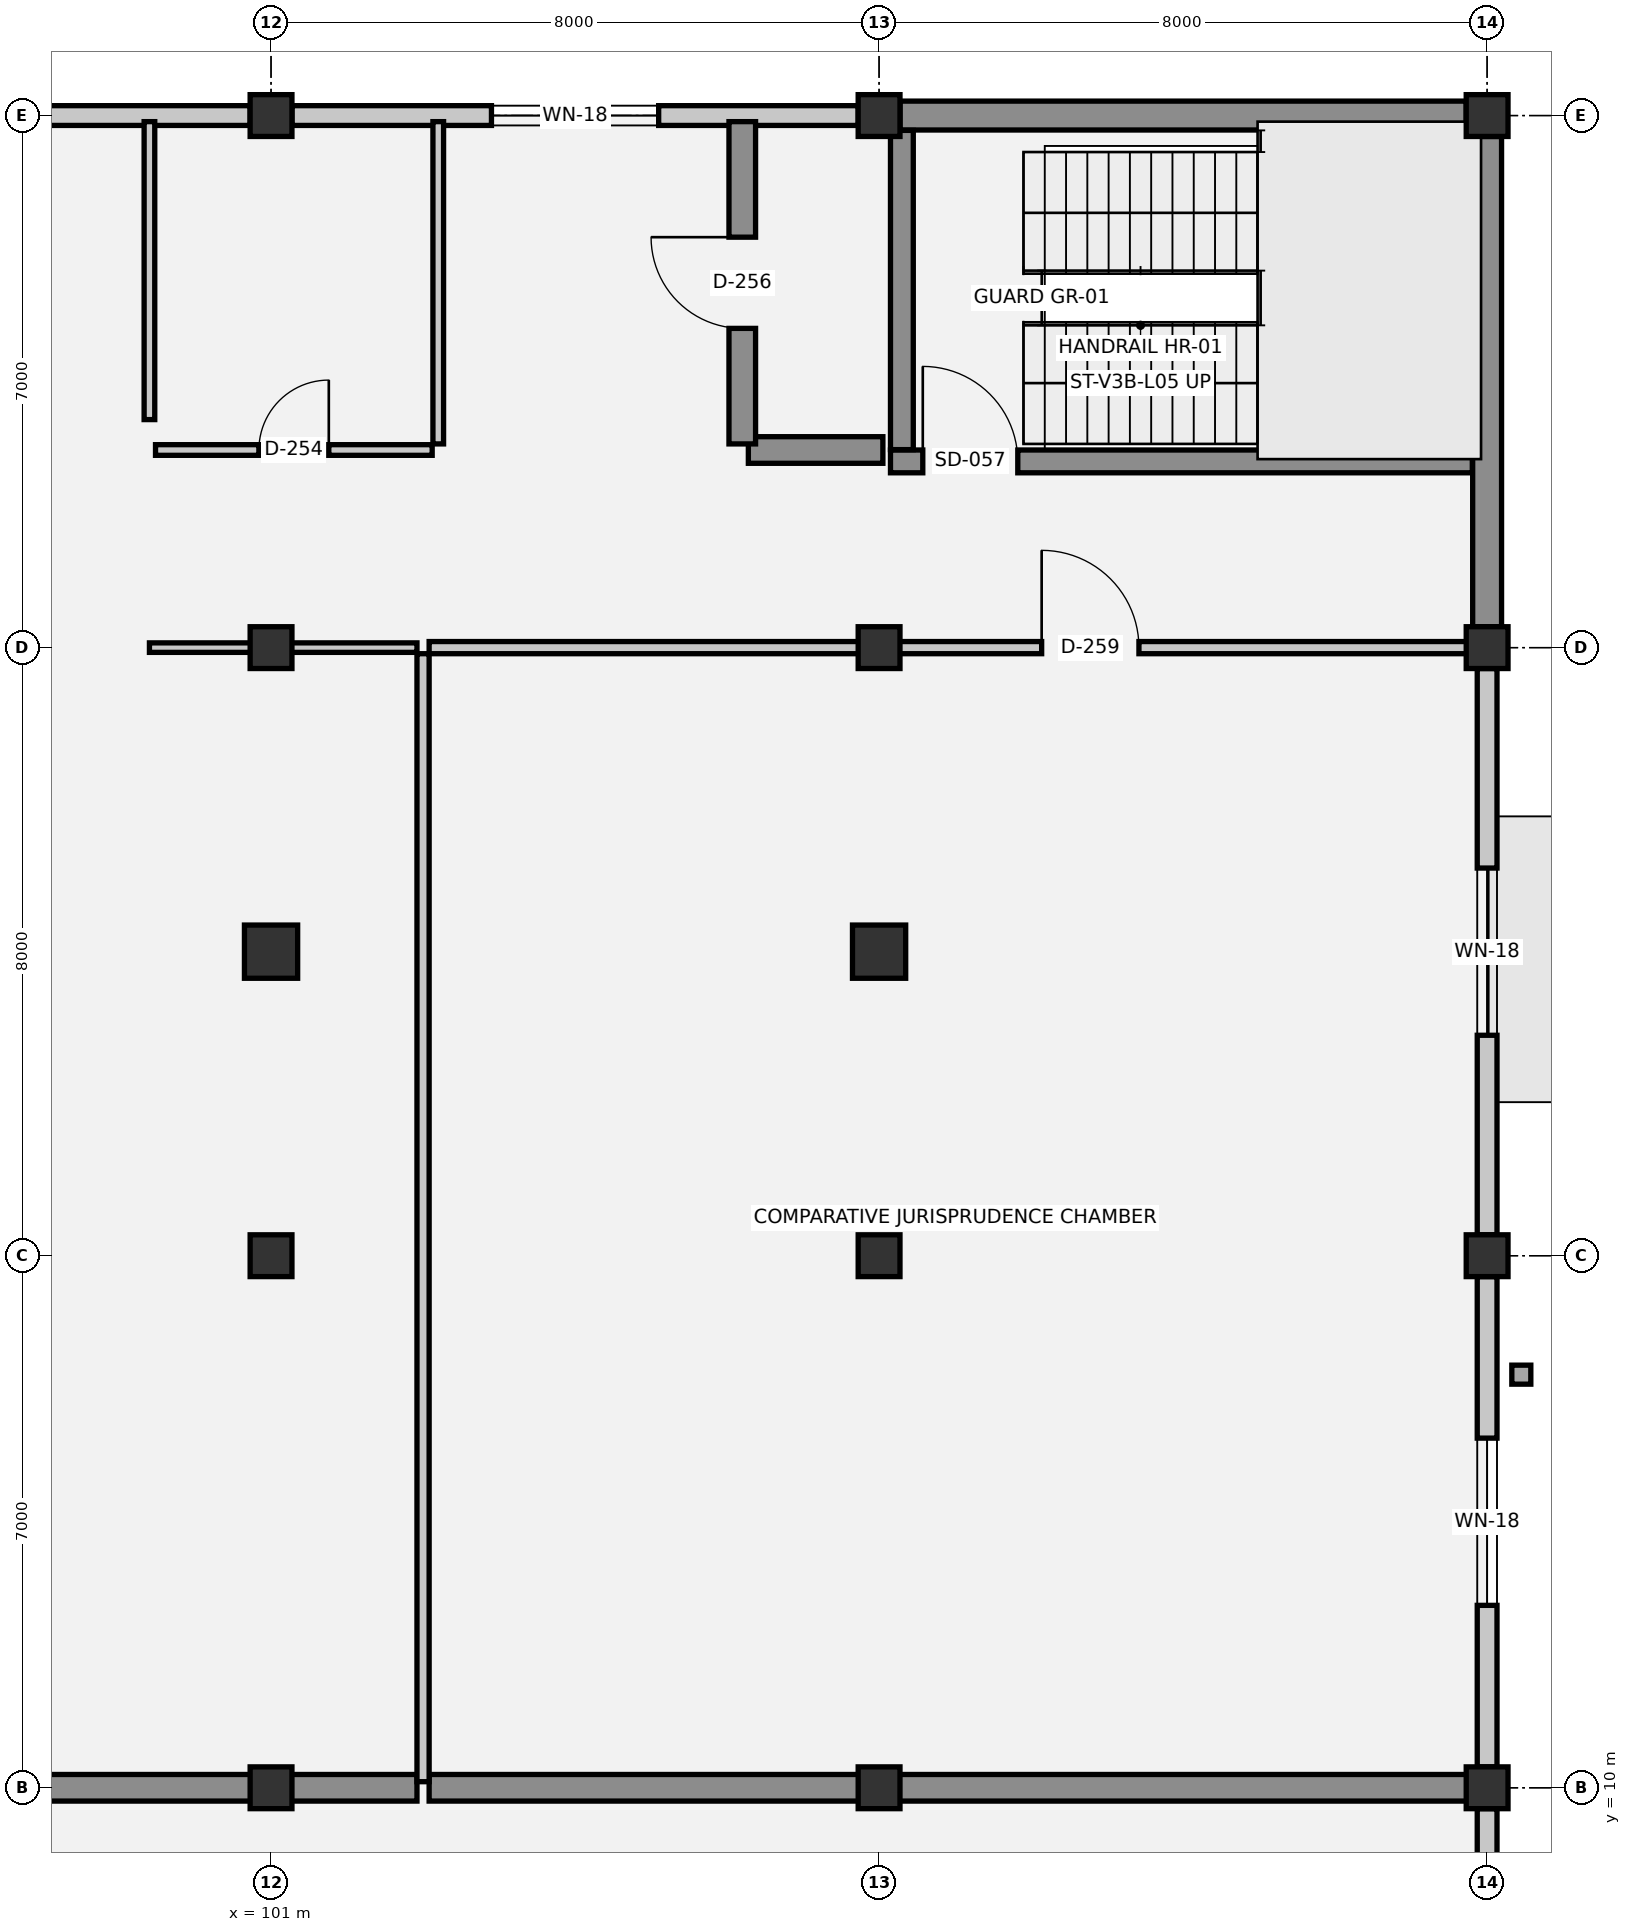
"""IFC4 building model, lengths in metres.
Left out: names, types, materials, properties, quantities, classifications, styles, units other than length and angle.
Written with IfcOpenShell. Run it as: python <this file> out.ifc"""

import sys

from ifc_helpers import new_model, si_unit, direction, frame, frame_2d, origin, origin_2d, place, context, subcontext, project, spatial, rectangle, circle, extrude, element, fill, save


model = new_model("IFC4")
c1 = context("Model", 3, precision=1e-05, world=origin(), true_north=direction((0.0, 1.0)))
c2 = subcontext(c1, "Body", "Model", "MODEL_VIEW")
j1 = project(units=[si_unit("LENGTHUNIT", "METRE"), si_unit("PLANEANGLEUNIT", "RADIAN")], contexts=[c1])
p1 = place(None, origin())
s1 = spatial("IfcSite", under=j1, at=p1, CompositionType="ELEMENT")
p2 = place(p1, origin())
s2 = spatial("IfcBuilding", under=s1, at=p2, CompositionType="ELEMENT")
p3 = place(p2, frame((0.0, 0.0, 18.3)))
s3 = spatial("IfcBuildingStorey", under=s2, at=p3, CompositionType="ELEMENT", Elevation=18.3)
for number, where, z_axis, x_axis in (
    (1, (101.0, 10.0, 0.0), (0.0, 0.0, 1.0), (1.0, 0.0, 0.0)),
    (2, (101.0, 17.0, 0.0), (0.0, 0.0, 1.0), (1.0, 0.0, 0.0)),
    (3, (101.0, 25.0, 0.0), (0.0, 0.0, 1.0), (1.0, 0.0, 0.0)),
    (4, (101.0, 32.0, 0.0), (0.0, 0.0, 1.0), (1.0, 0.0, 0.0)),
    (5, (109.0, 10.0, 0.0), (0.0, 0.0, 1.0), (1.0, 0.0, 0.0)),
    (6, (109.0, 17.0, 0.0), (0.0, 0.0, 1.0), (1.0, 0.0, 0.0)),
    (7, (109.0, 25.0, 0.0), (0.0, 0.0, 1.0), (1.0, 0.0, 0.0)),
    (8, (109.0, 32.0, 0.0), (0.0, 0.0, 1.0), (1.0, 0.0, 0.0)),
    (9, (117.0, 10.0, 0.0), (0.0, 0.0, 1.0), (1.0, 0.0, 0.0)),
    (10, (117.0, 17.0, 0.0), (0.0, 0.0, 1.0), (1.0, 0.0, 0.0)),
    (11, (117.0, 25.0, 0.0), (0.0, 0.0, 1.0), (1.0, 0.0, 0.0)),
    (12, (117.0, 32.0, 0.0), (0.0, 0.0, 1.0), (1.0, 0.0, 0.0)),
):
    element("IfcColumn", number, at=place(p3, frame(where, z_axis=z_axis, x_axis=x_axis)), inside=s3, PredefinedType="COLUMN", context=c2, shape_type="SweptSolid", body=[
        extrude(rectangle(XDim=0.55, YDim=0.55, at=origin_2d()), origin(), (0.0, 0.0, 1.0), 3.75),
    ])
for number, where, z_axis, x_axis in (
    (13, (101.0, 21.0, 0.0), (0.0, 0.0, 1.0), (1.0, 0.0, 0.0)),
    (14, (109.0, 21.0, 0.0), (0.0, 0.0, 1.0), (1.0, 0.0, 0.0)),
):
    element("IfcColumn", number, at=place(p3, frame(where, z_axis=z_axis, x_axis=x_axis)), inside=s3, PredefinedType="COLUMN", context=c2, shape_type="SweptSolid", body=[
        extrude(circle(Radius=0.35, at=origin_2d()), origin(), (0.0, 0.0, 1.0), 3.75),
    ])
p4 = place(p3, frame((93.275, 32.0, 0.0), z_axis=(0.0, 0.0, 1.0), x_axis=(1.0, 0.0, 0.0)))
e15 = element("IfcWall", 15, at=p4, inside=s3, PredefinedType="SOLIDWALL", context=c2, shape_type="SweptSolid", body=[
    extrude(rectangle(XDim=7.45, YDim=0.26, at=frame_2d((3.725, 0.0))), origin(), (0.0, 0.0, 1.0), 2.69),
])
p5 = place(p4, frame((1.525, 0.0, 0.0)))
e16 = element("IfcOpeningElement", 16, at=p5, cuts=e15, PredefinedType="OPENING", context=c2, shape_type="SweptSolid", body=[
    extrude(rectangle(XDim=1.8, YDim=2.25, at=frame_2d((0.9, 1.125))), frame((0.0, 0.14, 0.0), z_axis=(0.0, -1.0, 0.0), x_axis=(1.0, 0.0, 0.0)), (0.0, 0.0, 1.0), 0.28),
])
p6 = place(p3, frame((101.275, 32.0, 0.0), z_axis=(0.0, 0.0, 1.0), x_axis=(1.0, 0.0, 0.0)))
e17 = element("IfcWall", 17, at=p6, inside=s3, PredefinedType="SOLIDWALL", context=c2, shape_type="SweptSolid", body=[
    extrude(rectangle(XDim=7.45, YDim=0.26, at=frame_2d((3.725, 0.0))), origin(), (0.0, 0.0, 1.0), 2.69),
])
p7 = place(p6, frame((2.625, 0.0, 0.9)))
e18 = element("IfcOpeningElement", 18, at=p7, cuts=e17, PredefinedType="OPENING", context=c2, shape_type="SweptSolid", body=[
    extrude(rectangle(XDim=2.2, YDim=1.0, at=frame_2d((1.1, 0.5))), frame((0.0, 0.14, 0.0), z_axis=(0.0, -1.0, 0.0), x_axis=(1.0, 0.0, 0.0)), (0.0, 0.0, 1.0), 0.28),
])
p8 = place(p3, frame((109.275, 32.0, 0.0), z_axis=(0.0, 0.0, 1.0), x_axis=(1.0, 0.0, 0.0)))
e19 = element("IfcWall", 19, at=p8, inside=s3, PredefinedType="STANDARD", context=c2, shape_type="SweptSolid", body=[
    extrude(rectangle(XDim=7.45, YDim=0.38, at=frame_2d((3.725, 0.0))), origin(), (0.0, 0.0, 1.0), 2.69),
])
p9 = place(p3, frame((117.0, 31.725, 0.0), z_axis=(0.0, 0.0, 1.0), x_axis=(0.0, -1.0, 0.0)))
e20 = element("IfcWall", 20, at=p9, inside=s3, PredefinedType="STANDARD", context=c2, shape_type="SweptSolid", body=[
    extrude(rectangle(XDim=6.45, YDim=0.38, at=frame_2d((3.225, 0.0))), origin(), (0.0, 0.0, 1.0), 2.69),
])
p10 = place(p3, frame((117.0, 24.725, 0.0), z_axis=(0.0, 0.0, 1.0), x_axis=(0.0, -1.0, 0.0)))
e21 = element("IfcWall", 21, at=p10, inside=s3, PredefinedType="SOLIDWALL", context=c2, shape_type="SweptSolid", body=[
    extrude(rectangle(XDim=7.45, YDim=0.26, at=frame_2d((3.725, 0.0))), origin(), (0.0, 0.0, 1.0), 2.69),
])
p11 = place(p10, frame((2.625, 0.0, 0.9)))
e22 = element("IfcOpeningElement", 22, at=p11, cuts=e21, PredefinedType="OPENING", context=c2, shape_type="SweptSolid", body=[
    extrude(rectangle(XDim=2.2, YDim=1.0, at=frame_2d((1.1, 0.5))), frame((0.0, 0.14, 0.0), z_axis=(0.0, -1.0, 0.0), x_axis=(1.0, 0.0, 0.0)), (0.0, 0.0, 1.0), 0.28),
])
p12 = place(p3, frame((117.0, 16.725, 0.0), z_axis=(0.0, 0.0, 1.0), x_axis=(0.0, -1.0, 0.0)))
e23 = element("IfcWall", 23, at=p12, inside=s3, PredefinedType="SOLIDWALL", context=c2, shape_type="SweptSolid", body=[
    extrude(rectangle(XDim=6.45, YDim=0.26, at=frame_2d((3.225, 0.0))), origin(), (0.0, 0.0, 1.0), 2.69),
])
p13 = place(p12, frame((2.125, 0.0, 0.9)))
e24 = element("IfcOpeningElement", 24, at=p13, cuts=e23, PredefinedType="OPENING", context=c2, shape_type="SweptSolid", body=[
    extrude(rectangle(XDim=2.2, YDim=1.0, at=frame_2d((1.1, 0.5))), frame((0.0, 0.14, 0.0), z_axis=(0.0, -1.0, 0.0), x_axis=(1.0, 0.0, 0.0)), (0.0, 0.0, 1.0), 0.28),
])
p14 = place(p3, frame((117.0, 9.725, 0.0), z_axis=(0.0, 0.0, 1.0), x_axis=(0.0, -1.0, 0.0)))
e25 = element("IfcWall", 25, at=p14, inside=s3, PredefinedType="SOLIDWALL", context=c2, shape_type="SweptSolid", body=[
    extrude(rectangle(XDim=5.45, YDim=0.26, at=frame_2d((2.725, 0.0))), origin(), (0.0, 0.0, 1.0), 2.69),
])
p15 = place(p14, frame((2.175, 0.0, 0.9)))
e26 = element("IfcOpeningElement", 26, at=p15, cuts=e25, PredefinedType="OPENING", context=c2, shape_type="SweptSolid", body=[
    extrude(rectangle(XDim=1.1, YDim=1.2, at=frame_2d((0.55, 0.6))), frame((0.0, 0.14, 0.0), z_axis=(0.0, -1.0, 0.0), x_axis=(1.0, 0.0, 0.0)), (0.0, 0.0, 1.0), 0.28),
])
p16 = place(p3, frame((109.15, 27.45, 0.0), z_axis=(0.0, 0.0, 1.0), x_axis=(1.0, 0.0, 0.0)))
e27 = element("IfcWall", 27, at=p16, inside=s3, PredefinedType="SHEAR", context=c2, shape_type="SweptSolid", body=[
    extrude(rectangle(XDim=7.655, YDim=0.3, at=frame_2d((3.828, 0.0))), origin(), (0.0, 0.0, 1.0), 3.41),
])
p17 = place(p16, frame((0.425, 0.0, 0.0)))
e28 = element("IfcOpeningElement", 28, at=p17, cuts=e27, PredefinedType="OPENING", context=c2, shape_type="SweptSolid", body=[
    extrude(rectangle(XDim=1.25, YDim=2.15, at=frame_2d((0.625, 1.075))), frame((0.0, 0.16, 0.0), z_axis=(0.0, -1.0, 0.0), x_axis=(1.0, 0.0, 0.0)), (0.0, 0.0, 1.0), 0.32),
])
p18 = place(p3, frame((109.3, 31.805, 0.0), z_axis=(0.0, 0.0, 1.0), x_axis=(0.0, -1.0, 0.0)))
e29 = element("IfcWall", 29, at=p18, inside=s3, PredefinedType="SHEAR", context=c2, shape_type="SweptSolid", body=[
    extrude(rectangle(XDim=4.2, YDim=0.3, at=frame_2d((2.1, 0.0))), origin(), (0.0, 0.0, 1.0), 3.41),
])
p19 = place(p3, frame((84.88, 10.0, 0.0), z_axis=(0.0, 0.0, 1.0), x_axis=(1.0, 0.0, 0.0)))
e30 = element("IfcWall", 30, at=p19, inside=s3, PredefinedType="SHEAR", context=c2, shape_type="SweptSolid", body=[
    extrude(rectangle(XDim=18.04, YDim=0.35, at=frame_2d((9.02, 0.0))), origin(), (0.0, 0.0, 1.0), 3.39),
])
p20 = place(p3, frame((103.08, 10.0, 0.0), z_axis=(0.0, 0.0, 1.0), x_axis=(1.0, 0.0, 0.0)))
e31 = element("IfcWall", 31, at=p20, inside=s3, PredefinedType="SHEAR", context=c2, shape_type="SweptSolid", body=[
    extrude(rectangle(XDim=13.84, YDim=0.35, at=frame_2d((6.92, 0.0))), origin(), (0.0, 0.0, 1.0), 3.39),
])
p21 = place(p3, frame((99.4, 25.0, 0.0), z_axis=(0.0, 0.0, 1.0), x_axis=(1.0, 0.0, 0.0)))
e32 = element("IfcWall", 32, at=p21, inside=s3, PredefinedType="PARTITIONING", context=c2, shape_type="SweptSolid", body=[
    extrude(rectangle(XDim=3.52, YDim=0.125, at=frame_2d((1.76, 0.0))), origin(), (0.0, 0.0, 1.0), 2.81),
])
p22 = place(p3, frame((103.08, 25.0, 0.0), z_axis=(0.0, 0.0, 1.0), x_axis=(1.0, 0.0, 0.0)))
e33 = element("IfcWall", 33, at=p22, inside=s3, PredefinedType="PARTITIONING", context=c2, shape_type="SweptSolid", body=[
    extrude(rectangle(XDim=13.84, YDim=0.16, at=frame_2d((6.92, 0.0))), origin(), (0.0, 0.0, 1.0), 2.81),
])
p23 = place(p22, frame((8.059, 0.0, 0.0)))
e34 = element("IfcOpeningElement", 34, at=p23, cuts=e33, PredefinedType="OPENING", context=c2, shape_type="SweptSolid", body=[
    extrude(rectangle(XDim=1.28, YDim=2.2, at=frame_2d((0.64, 1.1))), frame((0.0, 0.09, 0.0), z_axis=(0.0, -1.0, 0.0), x_axis=(1.0, 0.0, 0.0)), (0.0, 0.0, 1.0), 0.18),
])
p24 = place(p3, frame((99.48, 27.6, 0.0), z_axis=(0.0, 0.0, 1.0), x_axis=(1.0, 0.0, 0.0)))
e35 = element("IfcWall", 35, at=p24, inside=s3, PredefinedType="PLUMBINGWALL", context=c2, shape_type="SweptSolid", body=[
    extrude(rectangle(XDim=3.64, YDim=0.14, at=frame_2d((1.82, 0.0))), origin(), (0.0, 0.0, 1.0), 3.39),
])
p25 = place(p24, frame((1.36, 0.0, 0.0)))
e36 = element("IfcOpeningElement", 36, at=p25, cuts=e35, PredefinedType="OPENING", context=c2, shape_type="SweptSolid", body=[
    extrude(rectangle(XDim=0.92, YDim=2.1, at=frame_2d((0.46, 1.05))), frame((0.0, 0.08, 0.0), z_axis=(0.0, -1.0, 0.0), x_axis=(1.0, 0.0, 0.0)), (0.0, 0.0, 1.0), 0.16),
])
p26 = place(p3, frame((107.28, 27.6, 0.0), z_axis=(0.0, 0.0, 1.0), x_axis=(1.0, 0.0, 0.0)))
e37 = element("IfcWall", 37, at=p26, inside=s3, PredefinedType="SHEAR", context=c2, shape_type="SweptSolid", body=[
    extrude(rectangle(XDim=1.77, YDim=0.35, at=frame_2d((0.885, 0.0))), origin(), (0.0, 0.0, 1.0), 3.39),
])
p27 = place(p3, frame((99.4, 28.0, 0.0), z_axis=(0.0, 0.0, 1.0), x_axis=(0.0, 1.0, 0.0)))
e38 = element("IfcWall", 38, at=p27, inside=s3, PredefinedType="PLUMBINGWALL", context=c2, shape_type="SweptSolid", body=[
    extrude(rectangle(XDim=3.92, YDim=0.14, at=frame_2d((1.96, 0.0))), origin(), (0.0, 0.0, 1.0), 3.39),
])
p28 = place(p3, frame((103.0, 10.08, 0.0), z_axis=(0.0, 0.0, 1.0), x_axis=(0.0, 1.0, 0.0)))
e39 = element("IfcWall", 39, at=p28, inside=s3, PredefinedType="PARTITIONING", context=c2, shape_type="SweptSolid", body=[
    extrude(rectangle(XDim=14.84, YDim=0.16, at=frame_2d((7.42, 0.0))), origin(), (0.0, 0.0, 1.0), 3.39),
])
p29 = place(p3, frame((103.2, 27.68, 0.0), z_axis=(0.0, 0.0, 1.0), x_axis=(0.0, 1.0, 0.0)))
e40 = element("IfcWall", 40, at=p29, inside=s3, PredefinedType="PLUMBINGWALL", context=c2, shape_type="SweptSolid", body=[
    extrude(rectangle(XDim=4.24, YDim=0.14, at=frame_2d((2.12, 0.0))), origin(), (0.0, 0.0, 1.0), 3.39),
])
p30 = place(p3, frame((107.2, 27.68, 0.0), z_axis=(0.0, 0.0, 1.0), x_axis=(0.0, 1.0, 0.0)))
e41 = element("IfcWall", 41, at=p30, inside=s3, PredefinedType="SHEAR", context=c2, shape_type="SweptSolid", body=[
    extrude(rectangle(XDim=4.24, YDim=0.35, at=frame_2d((2.12, 0.0))), origin(), (0.0, 0.0, 1.0), 3.39),
])
p31 = place(p30, frame((1.52, 0.0, 0.0)))
e42 = element("IfcOpeningElement", 42, at=p31, cuts=e41, PredefinedType="OPENING", context=c2, shape_type="SweptSolid", body=[
    extrude(rectangle(XDim=1.2, YDim=2.15, at=frame_2d((0.6, 1.075))), frame((0.0, 0.185, 0.0), z_axis=(0.0, -1.0, 0.0), x_axis=(1.0, 0.0, 0.0)), (0.0, 0.0, 1.0), 0.37),
])
p32 = place(p7, origin())
e43 = element("IfcWindow", 43, at=p32, inside=s3, PartitioningType="SINGLE_PANEL", PredefinedType="WINDOW", context=c2, shape_type="SweptSolid", body=[
    extrude(rectangle(XDim=2.2, YDim=1.0, at=frame_2d((1.1, 0.5))), frame((0.0, 0.03, 0.0), z_axis=(0.0, -1.0, 0.0), x_axis=(1.0, 0.0, 0.0)), (0.0, 0.0, 1.0), 0.06),
])
fill(e18, e43)
p33 = place(p11, origin())
e44 = element("IfcWindow", 44, at=p33, inside=s3, PartitioningType="SINGLE_PANEL", PredefinedType="WINDOW", context=c2, shape_type="SweptSolid", body=[
    extrude(rectangle(XDim=2.2, YDim=1.0, at=frame_2d((1.1, 0.5))), frame((0.0, 0.03, 0.0), z_axis=(0.0, -1.0, 0.0), x_axis=(1.0, 0.0, 0.0)), (0.0, 0.0, 1.0), 0.06),
])
fill(e22, e44)
p34 = place(p13, origin())
e45 = element("IfcWindow", 45, at=p34, inside=s3, PartitioningType="SINGLE_PANEL", PredefinedType="WINDOW", context=c2, shape_type="SweptSolid", body=[
    extrude(rectangle(XDim=2.2, YDim=1.0, at=frame_2d((1.1, 0.5))), frame((0.0, 0.03, 0.0), z_axis=(0.0, -1.0, 0.0), x_axis=(1.0, 0.0, 0.0)), (0.0, 0.0, 1.0), 0.06),
])
fill(e24, e45)
p35 = place(p17, origin())
e46 = element("IfcDoor", 46, at=p35, inside=s3, OperationType="SINGLE_SWING_LEFT", PredefinedType="DOOR", context=c2, shape_type="SweptSolid", body=[
    extrude(rectangle(XDim=1.25, YDim=2.15, at=frame_2d((0.625, 1.075))), frame((0.0, 0.025, 0.0), z_axis=(0.0, -1.0, 0.0), x_axis=(1.0, 0.0, 0.0)), (0.0, 0.0, 1.0), 0.05),
])
fill(e28, e46)
p36 = place(p25, origin())
e47 = element("IfcDoor", 47, at=p36, inside=s3, OperationType="SINGLE_SWING_RIGHT", PredefinedType="DOOR", context=c2, shape_type="SweptSolid", body=[
    extrude(rectangle(XDim=0.92, YDim=2.1, at=frame_2d((0.46, 1.05))), frame((0.0, 0.025, 0.0), z_axis=(0.0, -1.0, 0.0), x_axis=(1.0, 0.0, 0.0)), (0.0, 0.0, 1.0), 0.05),
])
fill(e36, e47)
p37 = place(p31, origin())
e48 = element("IfcDoor", 48, at=p37, inside=s3, OperationType="SINGLE_SWING_RIGHT", PredefinedType="DOOR", context=c2, shape_type="SweptSolid", body=[
    extrude(rectangle(XDim=1.2, YDim=2.15, at=frame_2d((0.6, 1.075))), frame((0.0, 0.025, 0.0), z_axis=(0.0, -1.0, 0.0), x_axis=(1.0, 0.0, 0.0)), (0.0, 0.0, 1.0), 0.05),
])
fill(e42, e48)
p38 = place(p23, origin())
e49 = element("IfcDoor", 49, at=p38, inside=s3, OperationType="SINGLE_SWING_LEFT", PredefinedType="DOOR", context=c2, shape_type="SweptSolid", body=[
    extrude(rectangle(XDim=1.28, YDim=2.2, at=frame_2d((0.64, 1.1))), frame((0.0, 0.025, 0.0), z_axis=(0.0, -1.0, 0.0), x_axis=(1.0, 0.0, 0.0)), (0.0, 0.0, 1.0), 0.05),
])
fill(e34, e49)
save(model, sys.argv[1])
